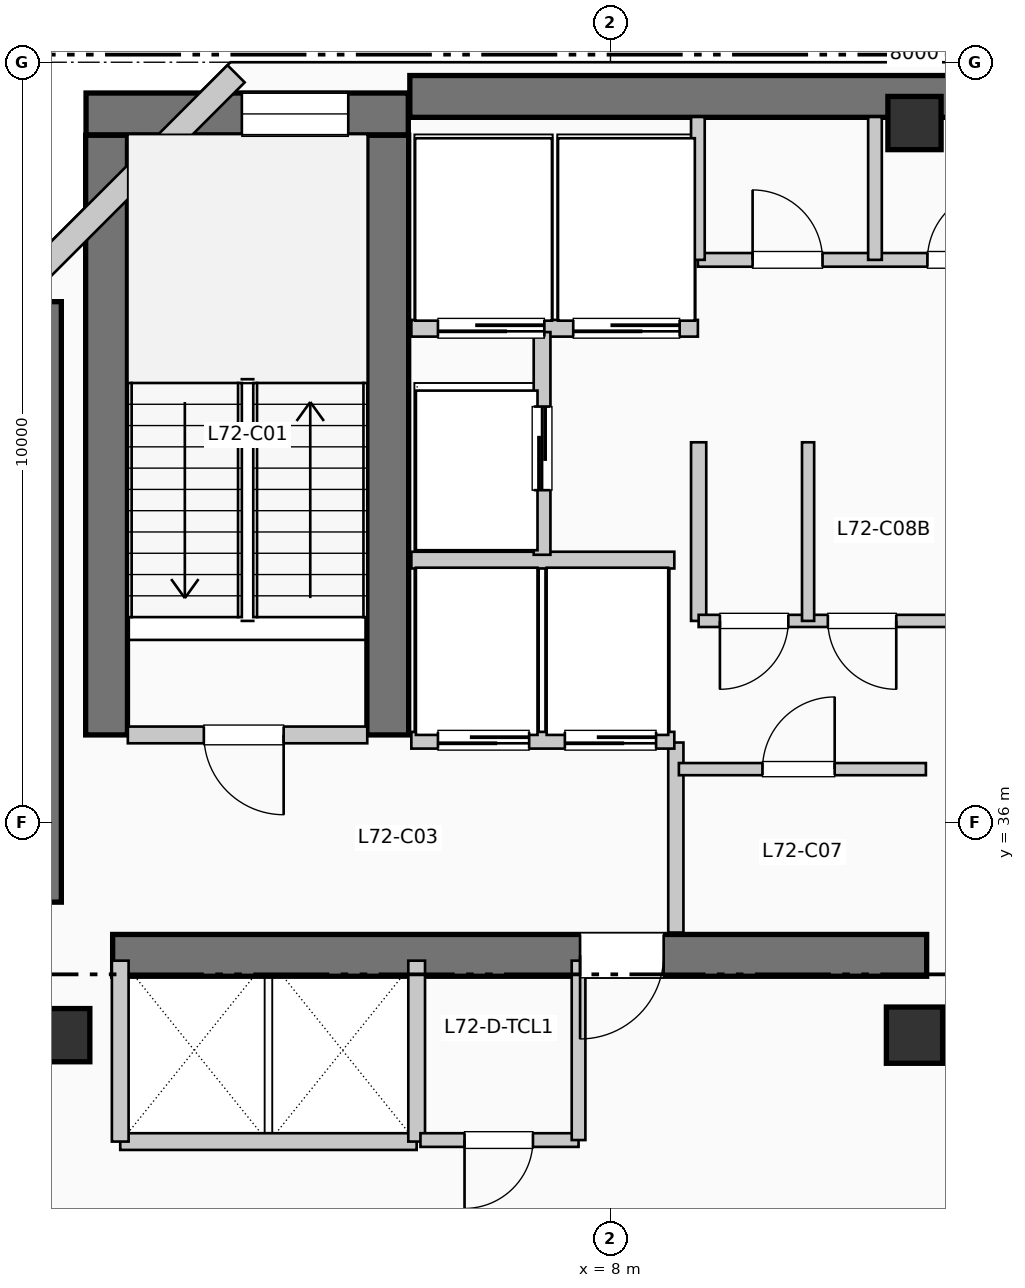
"""IFC4 building model, lengths in metres.
Left out: names, types, materials, properties, quantities, classifications, styles, units other than length and angle.
Written with IfcOpenShell. Run it as: python <this file> out.ifc"""

import sys

from ifc_helpers import new_model, si_unit, direction, frame, frame_2d, origin, origin_2d, place, context, subcontext, project, spatial, rectangle, extrude, element, fill, save


model = new_model("IFC4")
c1 = context("Model", 3, precision=1e-05, world=origin(), true_north=direction((0.0, 1.0)))
c2 = subcontext(c1, "Body", "Model", "MODEL_VIEW")
j1 = project(units=[si_unit("LENGTHUNIT", "METRE"), si_unit("PLANEANGLEUNIT", "RADIAN")], contexts=[c1])
p1 = place(None, origin())
s1 = spatial("IfcSite", under=j1, at=p1, CompositionType="ELEMENT")
p2 = place(p1, origin())
s2 = spatial("IfcBuilding", under=s1, at=p2, CompositionType="ELEMENT")
p3 = place(p2, frame((0.0, 0.0, 296.01)))
s3 = spatial("IfcBuildingStorey", under=s2, at=p3, CompositionType="ELEMENT", Elevation=296.01)
p4 = place(p3, frame((5.36, 45.55, 0.0), z_axis=(0.0, 0.0, 1.0), x_axis=(1.0, 0.0, 0.0)))
e1 = element("IfcWall", 1, at=p4, inside=s3, PredefinedType="SHEAR", context=c2, shape_type="SweptSolid", body=[
    extrude(rectangle(XDim=13.98, YDim=0.55, at=frame_2d((6.99, 0.0))), origin(), (0.0, 0.0, 1.0), 3.96),
])
p5 = place(p3, frame((0.5, 34.95, 0.0), z_axis=(0.0, 0.0, 1.0), x_axis=(0.0, 1.0, 0.0)))
e2 = element("IfcWall", 2, at=p5, inside=s3, PredefinedType="SHEAR", context=c2, shape_type="SweptSolid", body=[
    extrude(rectangle(XDim=7.9, YDim=0.55, at=frame_2d((3.95, 0.0))), origin(), (0.0, 0.0, 1.0), 3.96),
])
p6 = place(p3, frame((1.45, 34.25, 0.0), z_axis=(0.0, 0.0, 1.0), x_axis=(1.0, 0.0, 0.0)))
e3 = element("IfcWall", 3, at=p6, inside=s3, PredefinedType="SHEAR", context=c2, shape_type="SweptSolid", body=[
    extrude(rectangle(XDim=10.71, YDim=0.55, at=frame_2d((5.355, 0.0))), origin(), (0.0, 0.0, 1.0), 3.96),
])
p7 = place(p6, frame((7.25, 0.0, 0.0), z_axis=(0.0, 0.0, 1.0), x_axis=(-1.0, 0.0, 0.0)))
e4 = element("IfcOpeningElement", 4, at=p7, cuts=e3, PredefinedType="OPENING", context=c2, shape_type="SweptSolid", body=[
    extrude(rectangle(XDim=1.1, YDim=2.15, at=frame_2d((0.55, 1.075))), frame((0.0, 0.285, 0.0), z_axis=(0.0, -1.0, 0.0), x_axis=(1.0, 0.0, 0.0)), (0.0, 0.0, 1.0), 0.57),
])
for number, where, z_axis, x_axis in (
    (5, (1.37, 37.15, 0.0), (0.0, 0.0, 1.0), (0.0, 1.0, 0.0)),
    (6, (5.07, 37.15, 0.0), (0.0, 0.0, 1.0), (0.0, 1.0, 0.0)),
):
    element("IfcWall", number, at=place(p3, frame(where, z_axis=z_axis, x_axis=x_axis)), inside=s3, PredefinedType="SHEAR", context=c2, shape_type="SweptSolid", body=[
        extrude(rectangle(XDim=7.89, YDim=0.55, at=frame_2d((3.945, 0.0))), origin(), (0.0, 0.0, 1.0), 3.96),
    ])
p8 = place(p3, frame((1.1, 45.32, 0.0), z_axis=(0.0, 0.0, 1.0), x_axis=(1.0, 0.0, 0.0)))
e7 = element("IfcWall", 7, at=p8, inside=s3, PredefinedType="SHEAR", context=c2, shape_type="SweptSolid", body=[
    extrude(rectangle(XDim=4.24, YDim=0.55, at=frame_2d((2.12, 0.0))), origin(), (0.0, 0.0, 1.0), 3.96),
])
p9 = place(p8, frame((2.05, 0.0, 1.05)))
e8 = element("IfcOpeningElement", 8, at=p9, cuts=e7, PredefinedType="OPENING", context=c2, shape_type="SweptSolid", body=[
    extrude(rectangle(XDim=1.4, YDim=1.8, at=frame_2d((0.7, 0.9))), frame((0.0, 0.285, 0.0), z_axis=(0.0, -1.0, 0.0), x_axis=(1.0, 0.0, 0.0)), (0.0, 0.0, 1.0), 0.57),
])
p10 = place(p3, frame((0.8, 33.2, 0.0), z_axis=(0.0, 0.0, 1.0), x_axis=(1.0, 0.0, 0.0)))
e9 = element("IfcColumn", 9, at=p10, inside=s3, PredefinedType="COLUMN", context=c2, shape_type="SweptSolid", body=[
    extrude(rectangle(XDim=0.7, YDim=0.7, at=origin_2d()), origin(), (0.0, 0.0, 1.0), 3.96),
])
p11 = place(p3, frame((12.0, 33.2, 0.0), z_axis=(0.0, 0.0, 1.0), x_axis=(1.0, 0.0, 0.0)))
e10 = element("IfcColumn", 10, at=p11, inside=s3, PredefinedType="COLUMN", context=c2, shape_type="SweptSolid", body=[
    extrude(rectangle(XDim=0.74, YDim=0.74, at=origin_2d()), origin(), (0.0, 0.0, 1.0), 3.96),
])
p12 = place(p3, frame((12.0, 45.2, 0.0), z_axis=(0.0, 0.0, 1.0), x_axis=(1.0, 0.0, 0.0)))
e11 = element("IfcColumn", 11, at=p12, inside=s3, PredefinedType="COLUMN", context=c2, shape_type="SweptSolid", body=[
    extrude(rectangle(XDim=0.7, YDim=0.7, at=origin_2d()), origin(), (0.0, 0.0, 1.0), 3.96),
])
p13 = place(p3, frame((3.074, 45.848, 0.0), z_axis=(0.0, 0.0, 1.0), x_axis=(-0.707106781187, -0.707106781187, 0.0)))
e12 = element("IfcWall", 12, at=p13, inside=s3, PredefinedType="SOLIDWALL", context=c2, shape_type="SweptSolid", body=[
    extrude(rectangle(XDim=4.133, YDim=0.32, at=frame_2d((2.066, 0.0))), origin(), (0.0, 0.0, 1.0), 3.74),
])
p14 = place(p3, frame((1.65, 37.15, 0.0), z_axis=(0.0, 0.0, 1.0), x_axis=(1.0, 0.0, 0.0)))
e13 = element("IfcWall", 13, at=p14, inside=s3, PredefinedType="PARTITIONING", context=c2, shape_type="SweptSolid", body=[
    extrude(rectangle(XDim=3.15, YDim=0.22, at=frame_2d((1.575, 0.0))), origin(), (0.0, 0.0, 1.0), 3.74),
])
p15 = place(p14, frame((2.05, 0.0, 0.0), z_axis=(0.0, 0.0, 1.0), x_axis=(-1.0, 0.0, 0.0)))
e14 = element("IfcOpeningElement", 14, at=p15, cuts=e13, PredefinedType="OPENING", context=c2, shape_type="SweptSolid", body=[
    extrude(rectangle(XDim=1.05, YDim=2.15, at=frame_2d((0.525, 1.075))), frame((0.0, 0.12, 0.0), z_axis=(0.0, -1.0, 0.0), x_axis=(1.0, 0.0, 0.0)), (0.0, 0.0, 1.0), 0.24),
])
p16 = place(p3, frame((8.86, 34.55, 0.0), z_axis=(0.0, 0.0, 1.0), x_axis=(0.0, 1.0, 0.0)))
e15 = element("IfcWall", 15, at=p16, inside=s3, PredefinedType="PARTITIONING", context=c2, shape_type="SweptSolid", body=[
    extrude(rectangle(XDim=2.5, YDim=0.2, at=frame_2d((1.25, 0.0))), origin(), (0.0, 0.0, 1.0), 3.74),
])
p17 = place(p3, frame((5.38, 37.08, 0.0), z_axis=(0.0, 0.0, 1.0), x_axis=(1.0, 0.0, 0.0)))
e16 = element("IfcWall", 16, at=p17, inside=s3, PredefinedType="PARTITIONING", context=c2, shape_type="SweptSolid", body=[
    extrude(rectangle(XDim=3.46, YDim=0.22, at=frame_2d((1.73, 0.0))), origin(), (0.0, 0.0, 1.0), 3.74),
])
p18 = place(p17, frame((1.55, 0.0, 0.0), z_axis=(0.0, 0.0, 1.0), x_axis=(-1.0, 0.0, 0.0)))
e17 = element("IfcOpeningElement", 17, at=p18, cuts=e16, PredefinedType="OPENING", context=c2, shape_type="SweptSolid", body=[
    extrude(rectangle(XDim=1.2, YDim=2.2, at=frame_2d((0.6, 1.1))), frame((0.0, 0.12, 0.0), z_axis=(0.0, -1.0, 0.0), x_axis=(1.0, 0.0, 0.0)), (0.0, 0.0, 1.0), 0.24),
])
p19 = place(p17, frame((3.22, 0.0, 0.0), z_axis=(0.0, 0.0, 1.0), x_axis=(-1.0, 0.0, 0.0)))
e18 = element("IfcOpeningElement", 18, at=p19, cuts=e16, PredefinedType="OPENING", context=c2, shape_type="SweptSolid", body=[
    extrude(rectangle(XDim=1.2, YDim=2.2, at=frame_2d((0.6, 1.1))), frame((0.0, 0.12, 0.0), z_axis=(0.0, -1.0, 0.0), x_axis=(1.0, 0.0, 0.0)), (0.0, 0.0, 1.0), 0.24),
])
p20 = place(p3, frame((5.38, 39.45, 0.0), z_axis=(0.0, 0.0, 1.0), x_axis=(1.0, 0.0, 0.0)))
e19 = element("IfcWall", 19, at=p20, inside=s3, PredefinedType="PARTITIONING", context=c2, shape_type="SweptSolid", body=[
    extrude(rectangle(XDim=3.46, YDim=0.22, at=frame_2d((1.73, 0.0))), origin(), (0.0, 0.0, 1.0), 3.74),
])
p21 = place(p3, frame((5.38, 42.5, 0.0), z_axis=(0.0, 0.0, 1.0), x_axis=(1.0, 0.0, 0.0)))
e20 = element("IfcWall", 20, at=p21, inside=s3, PredefinedType="PARTITIONING", context=c2, shape_type="SweptSolid", body=[
    extrude(rectangle(XDim=3.77, YDim=0.22, at=frame_2d((1.885, 0.0))), origin(), (0.0, 0.0, 1.0), 3.74),
])
p22 = place(p21, frame((1.75, 0.0, 0.0), z_axis=(0.0, 0.0, 1.0), x_axis=(-1.0, 0.0, 0.0)))
e21 = element("IfcOpeningElement", 21, at=p22, cuts=e20, PredefinedType="OPENING", context=c2, shape_type="SweptSolid", body=[
    extrude(rectangle(XDim=1.4, YDim=2.2, at=frame_2d((0.7, 1.1))), frame((0.0, 0.12, 0.0), z_axis=(0.0, -1.0, 0.0), x_axis=(1.0, 0.0, 0.0)), (0.0, 0.0, 1.0), 0.24),
])
p23 = place(p21, frame((3.53, 0.0, 0.0), z_axis=(0.0, 0.0, 1.0), x_axis=(-1.0, 0.0, 0.0)))
e22 = element("IfcOpeningElement", 22, at=p23, cuts=e20, PredefinedType="OPENING", context=c2, shape_type="SweptSolid", body=[
    extrude(rectangle(XDim=1.4, YDim=2.2, at=frame_2d((0.7, 1.1))), frame((0.0, 0.12, 0.0), z_axis=(0.0, -1.0, 0.0), x_axis=(1.0, 0.0, 0.0)), (0.0, 0.0, 1.0), 0.24),
])
p24 = place(p3, frame((7.1, 39.52, 0.0), z_axis=(0.0, 0.0, 1.0), x_axis=(0.0, 1.0, 0.0)))
e23 = element("IfcWall", 23, at=p24, inside=s3, PredefinedType="PARTITIONING", context=c2, shape_type="SweptSolid", body=[
    extrude(rectangle(XDim=2.93, YDim=0.22, at=frame_2d((1.465, 0.0))), origin(), (0.0, 0.0, 1.0), 3.74),
])
p25 = place(p24, frame((0.85, 0.0, 0.0)))
e24 = element("IfcOpeningElement", 24, at=p25, cuts=e23, PredefinedType="OPENING", context=c2, shape_type="SweptSolid", body=[
    extrude(rectangle(XDim=1.1, YDim=2.2, at=frame_2d((0.55, 1.1))), frame((0.0, 0.12, 0.0), z_axis=(0.0, -1.0, 0.0), x_axis=(1.0, 0.0, 0.0)), (0.0, 0.0, 1.0), 0.24),
])
p26 = place(p3, frame((1.55, 31.8, 0.0), z_axis=(0.0, 0.0, 1.0), x_axis=(1.0, 0.0, 0.0)))
e25 = element("IfcWall", 25, at=p26, inside=s3, PredefinedType="PARTITIONING", context=c2, shape_type="SweptSolid", body=[
    extrude(rectangle(XDim=3.9, YDim=0.22, at=frame_2d((1.95, 0.0))), origin(), (0.0, 0.0, 1.0), 3.74),
])
for number, where, z_axis, x_axis in (
    (26, (1.55, 31.8, 0.0), (0.0, 0.0, 1.0), (0.0, 1.0, 0.0)),
    (27, (5.45, 31.8, 0.0), (0.0, 0.0, 1.0), (0.0, 1.0, 0.0)),
):
    element("IfcWall", number, at=place(p3, frame(where, z_axis=z_axis, x_axis=x_axis)), inside=s3, PredefinedType="PARTITIONING", context=c2, shape_type="SweptSolid", body=[
        extrude(rectangle(XDim=2.38, YDim=0.22, at=frame_2d((1.19, 0.0))), origin(), (0.0, 0.0, 1.0), 3.74),
    ])
p27 = place(p3, frame((9.16, 38.65, 0.0), z_axis=(0.0, 0.0, 1.0), x_axis=(0.0, 1.0, 0.0)))
e28 = element("IfcWall", 28, at=p27, inside=s3, PredefinedType="PARTITIONING", context=c2, shape_type="SweptSolid", body=[
    extrude(rectangle(XDim=2.35, YDim=0.2, at=frame_2d((1.175, 0.0))), origin(), (0.0, 0.0, 1.0), 3.74),
])
p28 = place(p3, frame((5.5, 31.82, 0.0), z_axis=(0.0, 0.0, 1.0), x_axis=(1.0, 0.0, 0.0)))
e29 = element("IfcWall", 29, at=p28, inside=s3, PredefinedType="PLUMBINGWALL", context=c2, shape_type="SweptSolid", body=[
    extrude(rectangle(XDim=2.08, YDim=0.18, at=frame_2d((1.04, 0.0))), origin(), (0.0, 0.0, 1.0), 3.74),
])
p29 = place(p28, frame((1.48, 0.0, 0.0), z_axis=(0.0, 0.0, 1.0), x_axis=(-1.0, 0.0, 0.0)))
e30 = element("IfcOpeningElement", 30, at=p29, cuts=e29, PredefinedType="OPENING", context=c2, shape_type="SweptSolid", body=[
    extrude(rectangle(XDim=0.9, YDim=2.1, at=frame_2d((0.45, 1.05))), frame((0.0, 0.1, 0.0), z_axis=(0.0, -1.0, 0.0), x_axis=(1.0, 0.0, 0.0)), (0.0, 0.0, 1.0), 0.2),
])
p30 = place(p3, frame((7.58, 31.82, 0.0), z_axis=(0.0, 0.0, 1.0), x_axis=(0.0, 1.0, 0.0)))
e31 = element("IfcWall", 31, at=p30, inside=s3, PredefinedType="PLUMBINGWALL", context=c2, shape_type="SweptSolid", body=[
    extrude(rectangle(XDim=2.36, YDim=0.18, at=frame_2d((1.18, 0.0))), origin(), (0.0, 0.0, 1.0), 3.74),
])
p31 = place(p3, frame((8.9, 36.7, 0.0), z_axis=(0.0, 0.0, 1.0), x_axis=(1.0, 0.0, 0.0)))
e32 = element("IfcWall", 32, at=p31, inside=s3, PredefinedType="PARTITIONING", context=c2, shape_type="SweptSolid", body=[
    extrude(rectangle(XDim=3.25, YDim=0.16, at=frame_2d((1.625, 0.0))), origin(), (0.0, 0.0, 1.0), 3.74),
])
p32 = place(p31, frame((1.1, 0.0, 0.0)))
e33 = element("IfcOpeningElement", 33, at=p32, cuts=e32, PredefinedType="OPENING", context=c2, shape_type="SweptSolid", body=[
    extrude(rectangle(XDim=0.95, YDim=2.15, at=frame_2d((0.475, 1.075))), frame((0.0, 0.09, 0.0), z_axis=(0.0, -1.0, 0.0), x_axis=(1.0, 0.0, 0.0)), (0.0, 0.0, 1.0), 0.18),
])
p33 = place(p3, frame((9.16, 38.65, 0.0), z_axis=(0.0, 0.0, 1.0), x_axis=(1.0, 0.0, 0.0)))
e34 = element("IfcWall", 34, at=p33, inside=s3, PredefinedType="PARTITIONING", context=c2, shape_type="SweptSolid", body=[
    extrude(rectangle(XDim=3.42, YDim=0.16, at=frame_2d((1.71, 0.0))), origin(), (0.0, 0.0, 1.0), 3.74),
])
p34 = place(p33, frame((1.18, 0.0, 0.0), z_axis=(0.0, 0.0, 1.0), x_axis=(-1.0, 0.0, 0.0)))
e35 = element("IfcOpeningElement", 35, at=p34, cuts=e34, PredefinedType="OPENING", context=c2, shape_type="SweptSolid", body=[
    extrude(rectangle(XDim=0.9, YDim=2.15, at=frame_2d((0.45, 1.075))), frame((0.0, 0.09, 0.0), z_axis=(0.0, -1.0, 0.0), x_axis=(1.0, 0.0, 0.0)), (0.0, 0.0, 1.0), 0.18),
])
p35 = place(p33, frame((2.6, 0.0, 0.0), z_axis=(0.0, 0.0, 1.0), x_axis=(-1.0, 0.0, 0.0)))
e36 = element("IfcOpeningElement", 36, at=p35, cuts=e34, PredefinedType="OPENING", context=c2, shape_type="SweptSolid", body=[
    extrude(rectangle(XDim=0.9, YDim=2.15, at=frame_2d((0.45, 1.075))), frame((0.0, 0.09, 0.0), z_axis=(0.0, -1.0, 0.0), x_axis=(1.0, 0.0, 0.0)), (0.0, 0.0, 1.0), 0.18),
])
p36 = place(p3, frame((10.6, 38.65, 0.0), z_axis=(0.0, 0.0, 1.0), x_axis=(0.0, 1.0, 0.0)))
e37 = element("IfcWall", 37, at=p36, inside=s3, PredefinedType="PARTITIONING", context=c2, shape_type="SweptSolid", body=[
    extrude(rectangle(XDim=2.35, YDim=0.16, at=frame_2d((1.175, 0.0))), origin(), (0.0, 0.0, 1.0), 3.74),
])
p37 = place(p3, frame((9.15, 43.4, 0.0), z_axis=(0.0, 0.0, 1.0), x_axis=(1.0, 0.0, 0.0)))
e38 = element("IfcWall", 38, at=p37, inside=s3, PredefinedType="PLUMBINGWALL", context=c2, shape_type="SweptSolid", body=[
    extrude(rectangle(XDim=9.33, YDim=0.18, at=frame_2d((4.665, 0.0))), origin(), (0.0, 0.0, 1.0), 3.74),
])
p38 = place(p37, frame((0.72, 0.0, 0.0)))
e39 = element("IfcOpeningElement", 39, at=p38, cuts=e38, PredefinedType="OPENING", context=c2, shape_type="SweptSolid", body=[
    extrude(rectangle(XDim=0.92, YDim=2.1, at=frame_2d((0.46, 1.05))), frame((0.0, 0.1, 0.0), z_axis=(0.0, -1.0, 0.0), x_axis=(1.0, 0.0, 0.0)), (0.0, 0.0, 1.0), 0.2),
])
p39 = place(p37, frame((3.02, 0.0, 0.0)))
e40 = element("IfcOpeningElement", 40, at=p39, cuts=e38, PredefinedType="OPENING", context=c2, shape_type="SweptSolid", body=[
    extrude(rectangle(XDim=0.92, YDim=2.1, at=frame_2d((0.46, 1.05))), frame((0.0, 0.1, 0.0), z_axis=(0.0, -1.0, 0.0), x_axis=(1.0, 0.0, 0.0)), (0.0, 0.0, 1.0), 0.2),
])
p40 = place(p37, frame((5.34, 0.0, 0.0)))
e41 = element("IfcOpeningElement", 41, at=p40, cuts=e38, PredefinedType="OPENING", context=c2, shape_type="SweptSolid", body=[
    extrude(rectangle(XDim=0.92, YDim=2.1, at=frame_2d((0.46, 1.05))), frame((0.0, 0.1, 0.0), z_axis=(0.0, -1.0, 0.0), x_axis=(1.0, 0.0, 0.0)), (0.0, 0.0, 1.0), 0.2),
])
p41 = place(p37, frame((7.66, 0.0, 0.0)))
e42 = element("IfcOpeningElement", 42, at=p41, cuts=e38, PredefinedType="OPENING", context=c2, shape_type="SweptSolid", body=[
    extrude(rectangle(XDim=0.95, YDim=2.1, at=frame_2d((0.475, 1.05))), frame((0.0, 0.1, 0.0), z_axis=(0.0, -1.0, 0.0), x_axis=(1.0, 0.0, 0.0)), (0.0, 0.0, 1.0), 0.2),
])
for number, where, z_axis, x_axis in (
    (43, (9.15, 43.4, 0.0), (0.0, 0.0, 1.0), (0.0, 1.0, 0.0)),
    (44, (11.48, 43.4, 0.0), (0.0, 0.0, 1.0), (0.0, 1.0, 0.0)),
):
    element("IfcWall", number, at=place(p3, frame(where, z_axis=z_axis, x_axis=x_axis)), inside=s3, PredefinedType="PLUMBINGWALL", context=c2, shape_type="SweptSolid", body=[
        extrude(rectangle(XDim=1.88, YDim=0.18, at=frame_2d((0.94, 0.0))), origin(), (0.0, 0.0, 1.0), 3.74),
    ])
p42 = place(p9, origin())
e45 = element("IfcWindow", 45, at=p42, inside=s3, PartitioningType="SINGLE_PANEL", PredefinedType="WINDOW", context=c2, shape_type="SweptSolid", body=[
    extrude(rectangle(XDim=1.4, YDim=1.8, at=frame_2d((0.7, 0.9))), frame((0.0, 0.03, 0.0), z_axis=(0.0, -1.0, 0.0), x_axis=(1.0, 0.0, 0.0)), (0.0, 0.0, 1.0), 0.06),
])
fill(e8, e45)
p43 = place(p15, origin())
e46 = element("IfcDoor", 46, at=p43, inside=s3, OperationType="SINGLE_SWING_RIGHT", PredefinedType="DOOR", context=c2, shape_type="SweptSolid", body=[
    extrude(rectangle(XDim=1.05, YDim=2.15, at=frame_2d((0.525, 1.075))), frame((0.0, 0.025, 0.0), z_axis=(0.0, -1.0, 0.0), x_axis=(1.0, 0.0, 0.0)), (0.0, 0.0, 1.0), 0.05),
])
fill(e14, e46)
p44 = place(p7, origin())
e47 = element("IfcDoor", 47, at=p44, inside=s3, OperationType="SINGLE_SWING_LEFT", PredefinedType="DOOR", context=c2, shape_type="SweptSolid", body=[
    extrude(rectangle(XDim=1.1, YDim=2.15, at=frame_2d((0.55, 1.075))), frame((0.0, 0.025, 0.0), z_axis=(0.0, -1.0, 0.0), x_axis=(1.0, 0.0, 0.0)), (0.0, 0.0, 1.0), 0.05),
])
fill(e4, e47)
p45 = place(p18, origin())
e48 = element("IfcDoor", 48, at=p45, inside=s3, OperationType="SLIDING_TO_RIGHT", PredefinedType="DOOR", context=c2, shape_type="SweptSolid", body=[
    extrude(rectangle(XDim=1.2, YDim=2.2, at=frame_2d((0.6, 1.1))), frame((0.0, 0.025, 0.0), z_axis=(0.0, -1.0, 0.0), x_axis=(1.0, 0.0, 0.0)), (0.0, 0.0, 1.0), 0.05),
])
fill(e17, e48)
p46 = place(p19, origin())
e49 = element("IfcDoor", 49, at=p46, inside=s3, OperationType="SLIDING_TO_RIGHT", PredefinedType="DOOR", context=c2, shape_type="SweptSolid", body=[
    extrude(rectangle(XDim=1.2, YDim=2.2, at=frame_2d((0.6, 1.1))), frame((0.0, 0.025, 0.0), z_axis=(0.0, -1.0, 0.0), x_axis=(1.0, 0.0, 0.0)), (0.0, 0.0, 1.0), 0.05),
])
fill(e18, e49)
p47 = place(p22, origin())
e50 = element("IfcDoor", 50, at=p47, inside=s3, OperationType="SLIDING_TO_LEFT", PredefinedType="DOOR", context=c2, shape_type="SweptSolid", body=[
    extrude(rectangle(XDim=1.4, YDim=2.2, at=frame_2d((0.7, 1.1))), frame((0.0, 0.025, 0.0), z_axis=(0.0, -1.0, 0.0), x_axis=(1.0, 0.0, 0.0)), (0.0, 0.0, 1.0), 0.05),
])
fill(e21, e50)
p48 = place(p23, origin())
e51 = element("IfcDoor", 51, at=p48, inside=s3, OperationType="SLIDING_TO_LEFT", PredefinedType="DOOR", context=c2, shape_type="SweptSolid", body=[
    extrude(rectangle(XDim=1.4, YDim=2.2, at=frame_2d((0.7, 1.1))), frame((0.0, 0.025, 0.0), z_axis=(0.0, -1.0, 0.0), x_axis=(1.0, 0.0, 0.0)), (0.0, 0.0, 1.0), 0.05),
])
fill(e22, e51)
p49 = place(p25, origin())
e52 = element("IfcDoor", 52, at=p49, inside=s3, OperationType="SLIDING_TO_LEFT", PredefinedType="DOOR", context=c2, shape_type="SweptSolid", body=[
    extrude(rectangle(XDim=1.1, YDim=2.2, at=frame_2d((0.55, 1.1))), frame((0.0, 0.025, 0.0), z_axis=(0.0, -1.0, 0.0), x_axis=(1.0, 0.0, 0.0)), (0.0, 0.0, 1.0), 0.05),
])
fill(e24, e52)
p50 = place(p29, origin())
e53 = element("IfcDoor", 53, at=p50, inside=s3, OperationType="SINGLE_SWING_LEFT", PredefinedType="DOOR", context=c2, shape_type="SweptSolid", body=[
    extrude(rectangle(XDim=0.9, YDim=2.1, at=frame_2d((0.45, 1.05))), frame((0.0, 0.025, 0.0), z_axis=(0.0, -1.0, 0.0), x_axis=(1.0, 0.0, 0.0)), (0.0, 0.0, 1.0), 0.05),
])
fill(e30, e53)
p51 = place(p32, origin())
e54 = element("IfcDoor", 54, at=p51, inside=s3, OperationType="SINGLE_SWING_RIGHT", PredefinedType="DOOR", context=c2, shape_type="SweptSolid", body=[
    extrude(rectangle(XDim=0.95, YDim=2.15, at=frame_2d((0.475, 1.075))), frame((0.0, 0.025, 0.0), z_axis=(0.0, -1.0, 0.0), x_axis=(1.0, 0.0, 0.0)), (0.0, 0.0, 1.0), 0.05),
])
fill(e33, e54)
p52 = place(p34, origin())
e55 = element("IfcDoor", 55, at=p52, inside=s3, OperationType="SINGLE_SWING_LEFT", PredefinedType="DOOR", context=c2, shape_type="SweptSolid", body=[
    extrude(rectangle(XDim=0.9, YDim=2.15, at=frame_2d((0.45, 1.075))), frame((0.0, 0.025, 0.0), z_axis=(0.0, -1.0, 0.0), x_axis=(1.0, 0.0, 0.0)), (0.0, 0.0, 1.0), 0.05),
])
fill(e35, e55)
p53 = place(p35, origin())
e56 = element("IfcDoor", 56, at=p53, inside=s3, OperationType="SINGLE_SWING_RIGHT", PredefinedType="DOOR", context=c2, shape_type="SweptSolid", body=[
    extrude(rectangle(XDim=0.9, YDim=2.15, at=frame_2d((0.45, 1.075))), frame((0.0, 0.025, 0.0), z_axis=(0.0, -1.0, 0.0), x_axis=(1.0, 0.0, 0.0)), (0.0, 0.0, 1.0), 0.05),
])
fill(e36, e56)
p54 = place(p38, origin())
e57 = element("IfcDoor", 57, at=p54, inside=s3, OperationType="SINGLE_SWING_LEFT", PredefinedType="DOOR", context=c2, shape_type="SweptSolid", body=[
    extrude(rectangle(XDim=0.92, YDim=2.1, at=frame_2d((0.46, 1.05))), frame((0.0, 0.025, 0.0), z_axis=(0.0, -1.0, 0.0), x_axis=(1.0, 0.0, 0.0)), (0.0, 0.0, 1.0), 0.05),
])
fill(e39, e57)
p55 = place(p39, origin())
e58 = element("IfcDoor", 58, at=p55, inside=s3, OperationType="SINGLE_SWING_RIGHT", PredefinedType="DOOR", context=c2, shape_type="SweptSolid", body=[
    extrude(rectangle(XDim=0.92, YDim=2.1, at=frame_2d((0.46, 1.05))), frame((0.0, 0.025, 0.0), z_axis=(0.0, -1.0, 0.0), x_axis=(1.0, 0.0, 0.0)), (0.0, 0.0, 1.0), 0.05),
])
fill(e40, e58)
save(model, sys.argv[1])
